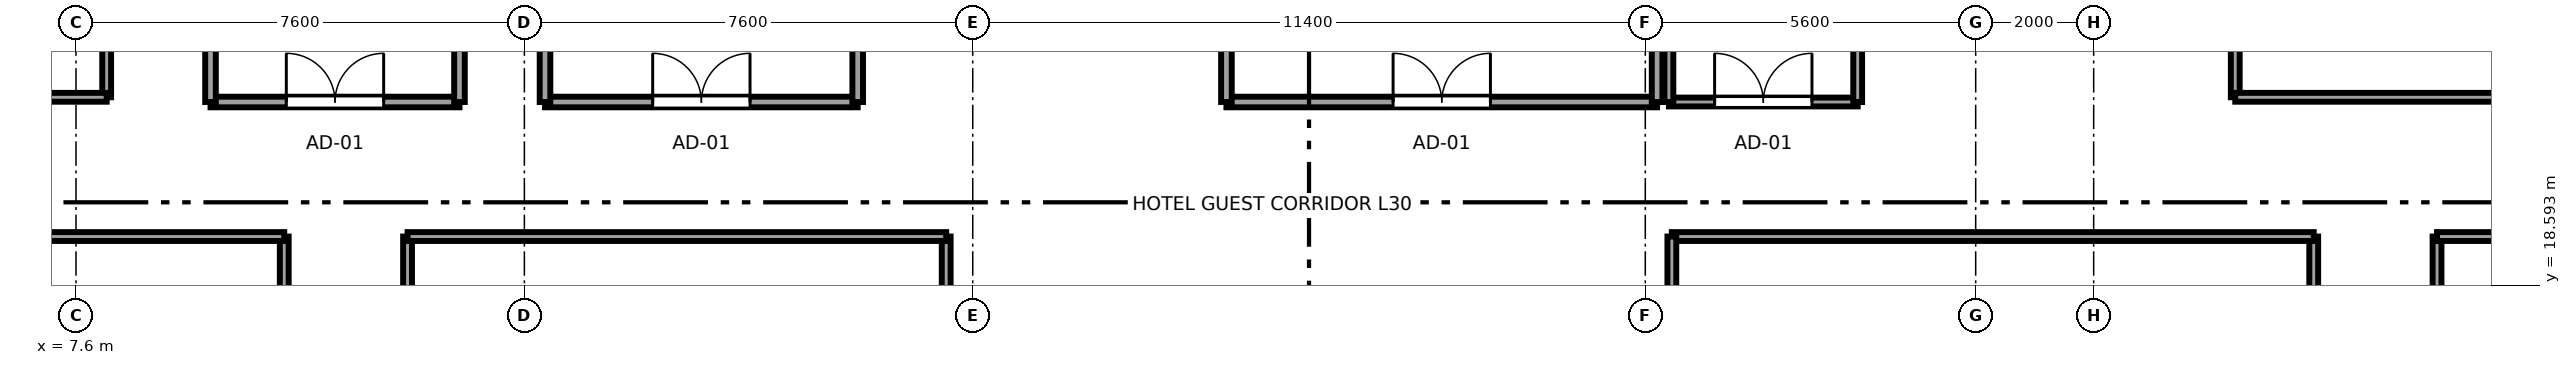
"""IFC4 building model, lengths in metres.
Left out: names, types, materials, properties, quantities, classifications, styles, units other than length and angle.
Written with IfcOpenShell. Run it as: python <this file> out.ifc"""

import sys

from ifc_helpers import new_model, si_unit, direction, frame, frame_2d, origin, place, context, subcontext, project, spatial, rectangle, extrude, source, transform, mapped, element, fill, save


model = new_model("IFC4")
c1 = context("Model", 3, precision=1e-05, world=origin(), true_north=direction((0.0, 1.0)))
c2 = subcontext(c1, "Body", "Model", "MODEL_VIEW")
j1 = project(units=[si_unit("LENGTHUNIT", "METRE"), si_unit("PLANEANGLEUNIT", "RADIAN")], contexts=[c1])
p1 = place(None, origin())
s1 = spatial("IfcSite", under=j1, at=p1, CompositionType="ELEMENT")
p2 = place(p1, origin())
s2 = spatial("IfcBuilding", under=s1, at=p2, CompositionType="ELEMENT")
p3 = place(p2, frame((0.0, 0.0, 118.65)))
s3 = spatial("IfcBuildingStorey", under=s2, at=p3, CompositionType="ELEMENT", Elevation=118.65)
p4 = place(p3, frame((11.13, 15.41, 0.0), z_axis=(0.0, 0.0, 1.0), x_axis=(0.0, 1.0, 0.0)))
e1 = element("IfcWall", 1, at=p4, inside=s3, PredefinedType="PARTITIONING", context=c2, shape_type="SweptSolid", body=[
    extrude(rectangle(XDim=4.01, YDim=0.15, at=frame_2d((2.005, 0.0))), origin(), (0.0, 0.0, 1.0), 3.37),
])
p5 = place(p4, frame((1.495, 0.0, 0.0)))
e2 = element("IfcOpeningElement", 2, at=p5, cuts=e1, PredefinedType="OPENING", context=c2, shape_type="SweptSolid", body=[
    extrude(rectangle(XDim=0.98, YDim=2.12, at=frame_2d((0.49, 1.06))), frame((0.0, 0.085, 0.0), z_axis=(0.0, -1.0, 0.0), x_axis=(1.0, 0.0, 0.0)), (0.0, 0.0, 1.0), 0.17),
])
p6 = place(p3, frame((0.405, 19.42, 0.0), z_axis=(0.0, 0.0, 1.0), x_axis=(1.0, 0.0, 0.0)))
e3 = element("IfcWall", 3, at=p6, inside=s3, PredefinedType="PARTITIONING", context=c2, shape_type="SweptSolid", body=[
    extrude(rectangle(XDim=10.725, YDim=0.15, at=frame_2d((5.362, 0.0))), origin(), (0.0, 0.0, 1.0), 3.37),
])
p7 = place(p3, frame((13.22, 12.01, 0.0), z_axis=(0.0, 0.0, 1.0), x_axis=(0.0, 1.0, 0.0)))
e4 = element("IfcWall", 4, at=p7, inside=s3, PredefinedType="PARTITIONING", context=c2, shape_type="SweptSolid", body=[
    extrude(rectangle(XDim=7.41, YDim=0.15, at=frame_2d((3.705, 0.0))), origin(), (0.0, 0.0, 1.0), 3.37),
])
p8 = place(p7, frame((3.195, 0.0, 0.0)))
e5 = element("IfcOpeningElement", 5, at=p8, cuts=e4, PredefinedType="OPENING", context=c2, shape_type="SweptSolid", body=[
    extrude(rectangle(XDim=0.98, YDim=2.12, at=frame_2d((0.49, 1.06))), frame((0.0, 0.085, 0.0), z_axis=(0.0, -1.0, 0.0), x_axis=(1.0, 0.0, 0.0)), (0.0, 0.0, 1.0), 0.17),
])
p9 = place(p3, frame((22.35, 9.68, 0.0), z_axis=(0.0, 0.0, 1.0), x_axis=(0.0, 1.0, 0.0)))
e6 = element("IfcWall", 6, at=p9, inside=s3, PredefinedType="PARTITIONING", context=c2, shape_type="SweptSolid", body=[
    extrude(rectangle(XDim=9.74, YDim=0.15, at=frame_2d((4.87, 0.0))), origin(), (0.0, 0.0, 1.0), 3.37),
])
p10 = place(p3, frame((13.22, 19.42, 0.0), z_axis=(0.0, 0.0, 1.0), x_axis=(1.0, 0.0, 0.0)))
e7 = element("IfcWall", 7, at=p10, inside=s3, PredefinedType="PARTITIONING", context=c2, shape_type="SweptSolid", body=[
    extrude(rectangle(XDim=9.13, YDim=0.15, at=frame_2d((4.565, 0.0))), origin(), (0.0, 0.0, 1.0), 3.37),
])
p11 = place(p3, frame((45.53, 16.61, 0.0), z_axis=(0.0, 0.0, 1.0), x_axis=(0.0, 1.0, 0.0)))
e8 = element("IfcWall", 8, at=p11, inside=s3, PredefinedType="PARTITIONING", context=c2, shape_type="SweptSolid", body=[
    extrude(rectangle(XDim=2.81, YDim=0.15, at=frame_2d((1.405, 0.0))), origin(), (0.0, 0.0, 1.0), 2.954),
])
p12 = place(p11, frame((0.895, 0.0, 0.0)))
e9 = element("IfcOpeningElement", 9, at=p12, cuts=e8, PredefinedType="OPENING", context=c2, shape_type="SweptSolid", body=[
    extrude(rectangle(XDim=0.98, YDim=2.12, at=frame_2d((0.49, 1.06))), frame((0.0, 0.085, 0.0), z_axis=(0.0, -1.0, 0.0), x_axis=(1.0, 0.0, 0.0)), (0.0, 0.0, 1.0), 0.17),
])
p13 = place(p3, frame((34.65, 19.42, 0.0), z_axis=(0.0, 0.0, 1.0), x_axis=(1.0, 0.0, 0.0)))
e10 = element("IfcWall", 10, at=p13, inside=s3, PredefinedType="PARTITIONING", context=c2, shape_type="SweptSolid", body=[
    extrude(rectangle(XDim=10.88, YDim=0.15, at=frame_2d((5.44, 0.0))), origin(), (0.0, 0.0, 1.0), 3.37),
])
p14 = place(p3, frame((34.65, 14.68, 0.0), z_axis=(0.0, 0.0, 1.0), x_axis=(0.0, 1.0, 0.0)))
e11 = element("IfcWall", 11, at=p14, inside=s3, PredefinedType="PARTITIONING", context=c2, shape_type="SweptSolid", body=[
    extrude(rectangle(XDim=4.74, YDim=0.15, at=frame_2d((2.37, 0.0))), origin(), (0.0, 0.0, 1.0), 3.37),
])
p15 = place(p3, frame((47.62, 12.21, 0.0), z_axis=(0.0, 0.0, 1.0), x_axis=(0.0, 1.0, 0.0)))
e12 = element("IfcWall", 12, at=p15, inside=s3, PredefinedType="PARTITIONING", context=c2, shape_type="SweptSolid", body=[
    extrude(rectangle(XDim=7.21, YDim=0.15, at=frame_2d((3.605, 0.0))), origin(), (0.0, 0.0, 1.0), 3.37),
])
p16 = place(p15, frame((3.095, 0.0, 0.0)))
e13 = element("IfcOpeningElement", 13, at=p16, cuts=e12, PredefinedType="OPENING", context=c2, shape_type="SweptSolid", body=[
    extrude(rectangle(XDim=0.98, YDim=2.12, at=frame_2d((0.49, 1.06))), frame((0.0, 0.085, 0.0), z_axis=(0.0, -1.0, 0.0), x_axis=(1.0, 0.0, 0.0)), (0.0, 0.0, 1.0), 0.17),
])
p17 = place(p3, frame((47.62, 19.42, 0.0), z_axis=(0.0, 0.0, 1.0), x_axis=(1.0, 0.0, 0.0)))
e14 = element("IfcWall", 14, at=p17, inside=s3, PredefinedType="PARTITIONING", context=c2, shape_type="SweptSolid", body=[
    extrude(rectangle(XDim=8.975, YDim=0.15, at=frame_2d((4.487, 0.0))), origin(), (0.0, 0.0, 1.0), 3.37),
])
p18 = place(p3, frame((8.12, 21.78, 0.0), z_axis=(0.0, 0.0, 1.0), x_axis=(0.0, 1.0, 0.0)))
e15 = element("IfcWall", 15, at=p18, inside=s3, PredefinedType="PARTITIONING", context=c2, shape_type="SweptSolid", body=[
    extrude(rectangle(XDim=12.54, YDim=0.15, at=frame_2d((6.27, 0.0))), origin(), (0.0, 0.0, 1.0), 3.37),
])
p19 = place(p18, frame((5.78, 0.0, 0.0)))
e16 = element("IfcOpeningElement", 16, at=p19, cuts=e15, PredefinedType="OPENING", context=c2, shape_type="SweptSolid", body=[
    extrude(rectangle(XDim=0.98, YDim=2.12, at=frame_2d((0.49, 1.06))), frame((0.0, 0.085, 0.0), z_axis=(0.0, -1.0, 0.0), x_axis=(1.0, 0.0, 0.0)), (0.0, 0.0, 1.0), 0.17),
])
p20 = place(p3, frame((2.77, 21.78, 0.0), z_axis=(0.0, 0.0, 1.0), x_axis=(1.0, 0.0, 0.0)))
e17 = element("IfcWall", 17, at=p20, inside=s3, PredefinedType="PARTITIONING", context=c2, shape_type="SweptSolid", body=[
    extrude(rectangle(XDim=5.35, YDim=0.15, at=frame_2d((2.675, 0.0))), origin(), (0.0, 0.0, 1.0), 3.37),
])
p21 = place(p3, frame((44.2, 21.78, 0.0), z_axis=(0.0, 0.0, 1.0), x_axis=(0.0, 1.0, 0.0)))
e18 = element("IfcWall", 18, at=p21, inside=s3, PredefinedType="PARTITIONING", context=c2, shape_type="SweptSolid", body=[
    extrude(rectangle(XDim=9.34, YDim=0.15, at=frame_2d((4.67, 0.0))), origin(), (0.0, 0.0, 1.0), 3.37),
])
p22 = place(p21, frame((4.18, 0.0, 0.0)))
e19 = element("IfcOpeningElement", 19, at=p22, cuts=e18, PredefinedType="OPENING", context=c2, shape_type="SweptSolid", body=[
    extrude(rectangle(XDim=0.98, YDim=2.12, at=frame_2d((0.49, 1.06))), frame((0.0, 0.085, 0.0), z_axis=(0.0, -1.0, 0.0), x_axis=(1.0, 0.0, 0.0)), (0.0, 0.0, 1.0), 0.17),
])
p23 = place(p3, frame((44.2, 21.78, 0.0), z_axis=(0.0, 0.0, 1.0), x_axis=(1.0, 0.0, 0.0)))
e20 = element("IfcWall", 20, at=p23, inside=s3, PredefinedType="PARTITIONING", context=c2, shape_type="SweptSolid", body=[
    extrude(rectangle(XDim=12.395, YDim=0.15, at=frame_2d((6.198, 0.0))), origin(), (0.0, 0.0, 1.0), 3.37),
])
p24 = place(p3, frame((9.88, 21.7, 0.0), z_axis=(0.0, 0.0, 1.0), x_axis=(1.0, 0.0, 0.0)))
e21 = element("IfcWall", 21, at=p24, inside=s3, PredefinedType="PARTITIONING", context=c2, shape_type="SweptSolid", body=[
    extrude(rectangle(XDim=4.22, YDim=0.18, at=frame_2d((2.11, 0.0))), origin(), (0.0, 0.0, 1.0), 3.37),
])
p25 = place(p24, frame((1.285, 0.0, 0.0)))
e22 = element("IfcOpeningElement", 22, at=p25, cuts=e21, PredefinedType="OPENING", context=c2, shape_type="SweptSolid", body=[
    extrude(rectangle(XDim=1.65, YDim=2.15, at=frame_2d((0.825, 1.075))), frame((0.0, 0.1, 0.0), z_axis=(0.0, -1.0, 0.0), x_axis=(1.0, 0.0, 0.0)), (0.0, 0.0, 1.0), 0.2),
])
for number, where, z_axis, x_axis in (
    (23, (9.88, 21.7, 0.0), (0.0, 0.0, 1.0), (0.0, 1.0, 0.0)),
    (24, (14.1, 21.7, 0.0), (0.0, 0.0, 1.0), (0.0, 1.0, 0.0)),
):
    element("IfcWall", number, at=place(p3, frame(where, z_axis=z_axis, x_axis=x_axis)), inside=s3, PredefinedType="PARTITIONING", context=c2, shape_type="SweptSolid", body=[
        extrude(rectangle(XDim=8.05, YDim=0.18, at=frame_2d((4.025, 0.0))), origin(), (0.0, 0.0, 1.0), 3.37),
    ])
p26 = place(p3, frame((27.1, 21.7, 0.0), z_axis=(0.0, 0.0, 1.0), x_axis=(1.0, 0.0, 0.0)))
e25 = element("IfcWall", 25, at=p26, inside=s3, PredefinedType="PARTITIONING", context=c2, shape_type="SweptSolid", body=[
    extrude(rectangle(XDim=7.3, YDim=0.18, at=frame_2d((3.65, 0.0))), origin(), (0.0, 0.0, 1.0), 3.37),
])
p27 = place(p26, frame((2.825, 0.0, 0.0)))
e26 = element("IfcOpeningElement", 26, at=p27, cuts=e25, PredefinedType="OPENING", context=c2, shape_type="SweptSolid", body=[
    extrude(rectangle(XDim=1.65, YDim=2.15, at=frame_2d((0.825, 1.075))), frame((0.0, 0.1, 0.0), z_axis=(0.0, -1.0, 0.0), x_axis=(1.0, 0.0, 0.0)), (0.0, 0.0, 1.0), 0.2),
])
for number, where, z_axis, x_axis in (
    (27, (27.1, 21.7, 0.0), (0.0, 0.0, 1.0), (0.0, 1.0, 0.0)),
    (28, (34.4, 21.7, 0.0), (0.0, 0.0, 1.0), (0.0, 1.0, 0.0)),
):
    element("IfcWall", number, at=place(p3, frame(where, z_axis=z_axis, x_axis=x_axis)), inside=s3, PredefinedType="PARTITIONING", context=c2, shape_type="SweptSolid", body=[
        extrude(rectangle(XDim=8.1, YDim=0.18, at=frame_2d((4.05, 0.0))), origin(), (0.0, 0.0, 1.0), 3.37),
    ])
p28 = place(p3, frame((15.55, 21.7, 0.0), z_axis=(0.0, 0.0, 1.0), x_axis=(1.0, 0.0, 0.0)))
e29 = element("IfcWall", 29, at=p28, inside=s3, PredefinedType="PARTITIONING", context=c2, shape_type="SweptSolid", body=[
    extrude(rectangle(XDim=5.3, YDim=0.18, at=frame_2d((2.65, 0.0))), origin(), (0.0, 0.0, 1.0), 3.37),
])
p29 = place(p28, frame((1.825, 0.0, 0.0)))
e30 = element("IfcOpeningElement", 30, at=p29, cuts=e29, PredefinedType="OPENING", context=c2, shape_type="SweptSolid", body=[
    extrude(rectangle(XDim=1.65, YDim=2.15, at=frame_2d((0.825, 1.075))), frame((0.0, 0.1, 0.0), z_axis=(0.0, -1.0, 0.0), x_axis=(1.0, 0.0, 0.0)), (0.0, 0.0, 1.0), 0.2),
])
for number, where, z_axis, x_axis in (
    (31, (15.55, 21.7, 0.0), (0.0, 0.0, 1.0), (0.0, 1.0, 0.0)),
    (32, (20.85, 21.7, 0.0), (0.0, 0.0, 1.0), (0.0, 1.0, 0.0)),
):
    element("IfcWall", number, at=place(p3, frame(where, z_axis=z_axis, x_axis=x_axis)), inside=s3, PredefinedType="PARTITIONING", context=c2, shape_type="SweptSolid", body=[
        extrude(rectangle(XDim=8.1, YDim=0.18, at=frame_2d((4.05, 0.0))), origin(), (0.0, 0.0, 1.0), 3.37),
    ])
p30 = place(p3, frame((34.6, 21.7, 0.0), z_axis=(0.0, 0.0, 1.0), x_axis=(1.0, 0.0, 0.0)))
e33 = element("IfcWall", 33, at=p30, inside=s3, PredefinedType="PARTITIONING", context=c2, shape_type="SweptSolid", body=[
    extrude(rectangle(XDim=3.2, YDim=0.15, at=frame_2d((1.6, 0.0))), origin(), (0.0, 0.0, 1.0), 3.37),
])
p31 = place(p30, frame((0.775, 0.0, 0.0)))
e34 = element("IfcOpeningElement", 34, at=p31, cuts=e33, PredefinedType="OPENING", context=c2, shape_type="SweptSolid", body=[
    extrude(rectangle(XDim=1.65, YDim=2.15, at=frame_2d((0.825, 1.075))), frame((0.0, 0.085, 0.0), z_axis=(0.0, -1.0, 0.0), x_axis=(1.0, 0.0, 0.0)), (0.0, 0.0, 1.0), 0.17),
])
for number, where, z_axis, x_axis in (
    (35, (34.6, 21.7, 0.0), (0.0, 0.0, 1.0), (0.0, 1.0, 0.0)),
    (36, (37.8, 21.7, 0.0), (0.0, 0.0, 1.0), (0.0, 1.0, 0.0)),
):
    element("IfcWall", number, at=place(p3, frame(where, z_axis=z_axis, x_axis=x_axis)), inside=s3, PredefinedType="PARTITIONING", context=c2, shape_type="SweptSolid", body=[
        extrude(rectangle(XDim=7.7, YDim=0.15, at=frame_2d((3.85, 0.0))), origin(), (0.0, 0.0, 1.0), 3.37),
    ])
m1 = source(origin(), c2, "Body", "SweptSolid", [
    extrude(rectangle(XDim=1.65, YDim=2.15, at=frame_2d((0.825, 1.075))), frame((0.0, 0.025, 0.0), z_axis=(0.0, -1.0, 0.0), x_axis=(1.0, 0.0, 0.0)), (0.0, 0.0, 1.0), 0.05),
])
p32 = place(p25, origin())
e37 = element("IfcDoor", 37, at=p32, inside=s3, OperationType="DOUBLE_DOOR_SINGLE_SWING", PredefinedType="DOOR", context=c2, shape_type="MappedRepresentation", body=[
    mapped(m1, transform((0.0, 0.0, 0.0), x_axis=(1.0, 0.0, 0.0), y_axis=(0.0, 1.0, 0.0), z_axis=(0.0, 0.0, 1.0), scale=1.0)),
])
fill(e22, e37)
p33 = place(p27, origin())
e38 = element("IfcDoor", 38, at=p33, inside=s3, OperationType="DOUBLE_DOOR_SINGLE_SWING", PredefinedType="DOOR", context=c2, shape_type="MappedRepresentation", body=[
    mapped(m1, transform((0.0, 0.0, 0.0), x_axis=(1.0, 0.0, 0.0), y_axis=(0.0, 1.0, 0.0), z_axis=(0.0, 0.0, 1.0), scale=1.0)),
])
fill(e26, e38)
p34 = place(p29, origin())
e39 = element("IfcDoor", 39, at=p34, inside=s3, OperationType="DOUBLE_DOOR_SINGLE_SWING", PredefinedType="DOOR", context=c2, shape_type="MappedRepresentation", body=[
    mapped(m1, transform((0.0, 0.0, 0.0), x_axis=(1.0, 0.0, 0.0), y_axis=(0.0, 1.0, 0.0), z_axis=(0.0, 0.0, 1.0), scale=1.0)),
])
fill(e30, e39)
p35 = place(p31, origin())
e40 = element("IfcDoor", 40, at=p35, inside=s3, OperationType="DOUBLE_DOOR_SINGLE_SWING", PredefinedType="DOOR", context=c2, shape_type="MappedRepresentation", body=[
    mapped(m1, transform((0.0, 0.0, 0.0), x_axis=(1.0, 0.0, 0.0), y_axis=(0.0, 1.0, 0.0), z_axis=(0.0, 0.0, 1.0), scale=1.0)),
])
fill(e34, e40)
save(model, sys.argv[1])
